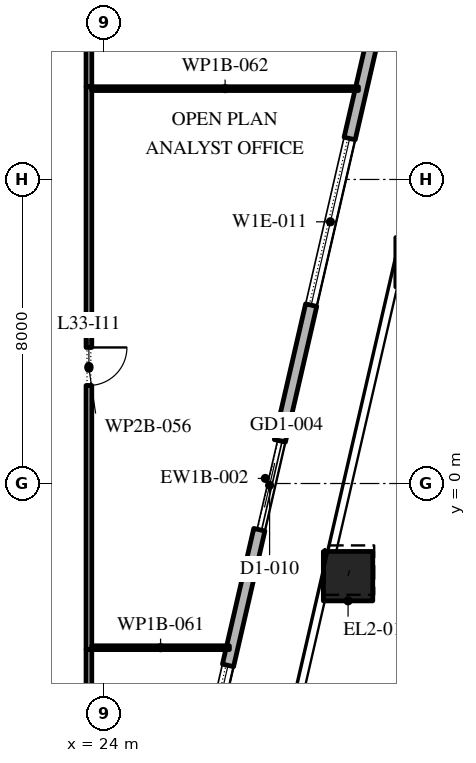
"""IFC4 building model, lengths in metres.
Left out: names, types, materials, properties, quantities, classifications, styles, units other than length and angle.
Written with IfcOpenShell. Run it as: python <this file> out.ifc"""

import sys

from ifc_helpers import new_model, si_unit, direction, frame, frame_2d, origin, origin_2d, place, context, subcontext, project, spatial, rectangle, extrude, element, fill, save


model = new_model("IFC4")
c1 = context("Model", 3, precision=1e-05, world=origin(), true_north=direction((0.0, 1.0)))
c2 = subcontext(c1, "Body", "Model", "MODEL_VIEW")
j1 = project(units=[si_unit("LENGTHUNIT", "METRE"), si_unit("PLANEANGLEUNIT", "RADIAN")], contexts=[c1])
p1 = place(None, origin())
s1 = spatial("IfcSite", under=j1, at=p1, CompositionType="ELEMENT")
p2 = place(p1, origin())
s2 = spatial("IfcBuilding", under=s1, at=p2, CompositionType="ELEMENT")
p3 = place(p2, frame((0.0, 0.0, 151.8)))
s3 = spatial("IfcBuildingStorey", under=s2, at=p3, CompositionType="ELEMENT", Elevation=151.8)
p4 = place(p3, frame((30.419, -2.438, 0.0), z_axis=(0.008770904004, 0.037871717951, 0.999244116431), x_axis=(-0.974214614928, 0.225623323396, 0.0)))
e1 = element("IfcColumn", 1, at=p4, inside=s3, PredefinedType="COLUMN", context=c2, shape_type="SweptSolid", body=[
    extrude(rectangle(XDim=1.3, YDim=1.3, at=origin_2d()), origin(), (0.0, 0.0, 1.0), 4.203),
])
p5 = place(p3, frame((32.326, 5.823, 0.0), z_axis=(0.011668267153, 0.050562490995, 0.998652735462), x_axis=(-0.974391195695, 0.224859506699, 0.0)))
e2 = element("IfcColumn", 2, at=p5, inside=s3, PredefinedType="COLUMN", context=c2, shape_type="SweptSolid", body=[
    extrude(rectangle(XDim=1.3, YDim=1.3, at=origin_2d()), origin(), (0.0, 0.0, 1.0), 4.206),
])
p6 = place(p3, frame((22.82, -24.016, 0.0), z_axis=(0.0, 0.0, 1.0), x_axis=(0.224953880882, 0.974369412223, 0.0)))
e3 = element("IfcWall", 3, at=p6, inside=s3, PredefinedType="STANDARD", context=c2, shape_type="SweptSolid", body=[
    extrude(rectangle(XDim=49.5, YDim=0.3, at=frame_2d((24.75, 0.0))), origin(), (0.0, 0.0, 1.0), 3.95),
])
p7 = place(p6, frame((1.157, 0.0, 0.45)))
e4 = element("IfcOpeningElement", 4, at=p7, cuts=e3, PredefinedType="OPENING", context=c2, shape_type="SweptSolid", body=[
    extrude(rectangle(XDim=4.5, YDim=3.05, at=frame_2d((2.25, 1.525))), frame((0.0, 0.16, 0.0), z_axis=(0.0, -1.0, 0.0), x_axis=(1.0, 0.0, 0.0)), (0.0, 0.0, 1.0), 0.32),
])
p8 = place(p6, frame((8.121, 0.0, 0.45)))
e5 = element("IfcOpeningElement", 5, at=p8, cuts=e3, PredefinedType="OPENING", context=c2, shape_type="SweptSolid", body=[
    extrude(rectangle(XDim=4.5, YDim=3.05, at=frame_2d((2.25, 1.525))), frame((0.0, 0.16, 0.0), z_axis=(0.0, -1.0, 0.0), x_axis=(1.0, 0.0, 0.0)), (0.0, 0.0, 1.0), 0.32),
])
p9 = place(p6, frame((15.236, 0.0, 0.45)))
e6 = element("IfcOpeningElement", 6, at=p9, cuts=e3, PredefinedType="OPENING", context=c2, shape_type="SweptSolid", body=[
    extrude(rectangle(XDim=4.5, YDim=3.05, at=frame_2d((2.25, 1.525))), frame((0.0, 0.16, 0.0), z_axis=(0.0, -1.0, 0.0), x_axis=(1.0, 0.0, 0.0)), (0.0, 0.0, 1.0), 0.32),
])
p10 = place(p6, frame((23.4, 0.0, 0.0)))
e7 = element("IfcOpeningElement", 7, at=p10, cuts=e3, PredefinedType="OPENING", context=c2, shape_type="SweptSolid", body=[
    extrude(rectangle(XDim=2.4, YDim=3.5, at=frame_2d((1.2, 1.75))), frame((0.0, 0.16, 0.0), z_axis=(0.0, -1.0, 0.0), x_axis=(1.0, 0.0, 0.0)), (0.0, 0.0, 1.0), 0.32),
])
p11 = place(p6, frame((29.464, 0.0, 0.45)))
e8 = element("IfcOpeningElement", 8, at=p11, cuts=e3, PredefinedType="OPENING", context=c2, shape_type="SweptSolid", body=[
    extrude(rectangle(XDim=4.5, YDim=2.825, at=frame_2d((2.25, 1.413))), frame((0.0, 0.16, 0.0), z_axis=(0.0, -1.0, 0.0), x_axis=(1.0, 0.0, 0.0)), (0.0, 0.0, 1.0), 0.32),
])
p12 = place(p6, frame((36.579, 0.0, 0.45)))
e9 = element("IfcOpeningElement", 9, at=p12, cuts=e3, PredefinedType="OPENING", context=c2, shape_type="SweptSolid", body=[
    extrude(rectangle(XDim=4.5, YDim=2.775, at=frame_2d((2.25, 1.387))), frame((0.0, 0.16, 0.0), z_axis=(0.0, -1.0, 0.0), x_axis=(1.0, 0.0, 0.0)), (0.0, 0.0, 1.0), 0.32),
])
p13 = place(p6, frame((43.693, 0.0, 0.45)))
e10 = element("IfcOpeningElement", 10, at=p13, cuts=e3, PredefinedType="OPENING", context=c2, shape_type="SweptSolid", body=[
    extrude(rectangle(XDim=4.5, YDim=2.7, at=frame_2d((2.25, 1.35))), frame((0.0, 0.16, 0.0), z_axis=(0.0, -1.0, 0.0), x_axis=(1.0, 0.0, 0.0)), (0.0, 0.0, 1.0), 0.32),
])
p14 = place(p3, frame((23.6, -4.37, 0.0), z_axis=(0.0, 0.0, 1.0), x_axis=(0.0, -1.0, 0.0)))
e11 = element("IfcWall", 11, at=p14, inside=s3, PredefinedType="PARTITIONING", context=c2, shape_type="SweptSolid", body=[
    extrude(rectangle(XDim=2.855, YDim=0.15, at=frame_2d((1.427, 0.0))), origin(), (0.0, 0.0, 1.0), 3.95),
])
p15 = place(p3, frame((23.6, 10.44, 0.0), z_axis=(0.0, 0.0, 1.0), x_axis=(0.0, -1.0, 0.0)))
e12 = element("IfcWall", 12, at=p15, inside=s3, PredefinedType="PARTITIONING", context=c2, shape_type="SweptSolid", body=[
    extrude(rectangle(XDim=14.81, YDim=0.15, at=frame_2d((7.405, 0.0))), origin(), (0.0, 0.0, 1.0), 3.95),
])
p16 = place(p15, frame((6.86, 0.0, 0.0)))
e13 = element("IfcOpeningElement", 13, at=p16, cuts=e12, PredefinedType="OPENING", context=c2, shape_type="SweptSolid", body=[
    extrude(rectangle(XDim=1.0, YDim=2.1, at=frame_2d((0.5, 1.05))), frame((0.0, 0.085, 0.0), z_axis=(0.0, -1.0, 0.0), x_axis=(1.0, 0.0, 0.0)), (0.0, 0.0, 1.0), 0.17),
])
p17 = place(p3, frame((23.6, 23.46, 0.0), z_axis=(0.0, 0.0, 1.0), x_axis=(0.0, -1.0, 0.0)))
e14 = element("IfcWall", 14, at=p17, inside=s3, PredefinedType="PARTITIONING", context=c2, shape_type="SweptSolid", body=[
    extrude(rectangle(XDim=13.02, YDim=0.15, at=frame_2d((6.51, 0.0))), origin(), (0.0, 0.0, 1.0), 3.95),
])
p18 = place(p17, frame((6.17, 0.0, 0.0)))
e15 = element("IfcOpeningElement", 15, at=p18, cuts=e14, PredefinedType="OPENING", context=c2, shape_type="SweptSolid", body=[
    extrude(rectangle(XDim=1.0, YDim=2.1, at=frame_2d((0.5, 1.05))), frame((0.0, 0.085, 0.0), z_axis=(0.0, -1.0, 0.0), x_axis=(1.0, 0.0, 0.0)), (0.0, 0.0, 1.0), 0.17),
])
p19 = place(p3, frame((27.296, -4.32, 0.0), z_axis=(0.0, 0.0, 1.0), x_axis=(-1.0, 0.0, 0.0)))
e16 = element("IfcWall", 16, at=p19, inside=s3, PredefinedType="PARTITIONING", context=c2, shape_type="SweptSolid", body=[
    extrude(rectangle(XDim=3.621, YDim=0.1, at=frame_2d((1.811, 0.0))), origin(), (0.0, 0.0, 1.0), 3.95),
])
p20 = place(p3, frame((30.692, 10.39, 0.0), z_axis=(0.0, 0.0, 1.0), x_axis=(-1.0, 0.0, 0.0)))
e17 = element("IfcWall", 17, at=p20, inside=s3, PredefinedType="PARTITIONING", context=c2, shape_type="SweptSolid", body=[
    extrude(rectangle(XDim=7.017, YDim=0.1, at=frame_2d((3.508, 0.0))), origin(), (0.0, 0.0, 1.0), 3.95),
])
p21 = place(p9, origin())
e18 = element("IfcWindow", 18, at=p21, inside=s3, PartitioningType="DOUBLE_PANEL_VERTICAL", PredefinedType="WINDOW", context=c2, shape_type="SweptSolid", body=[
    extrude(rectangle(XDim=4.5, YDim=3.05, at=frame_2d((2.25, 1.525))), frame((0.0, 0.03, 0.0), z_axis=(0.0, -1.0, 0.0), x_axis=(1.0, 0.0, 0.0)), (0.0, 0.0, 1.0), 0.06),
])
fill(e6, e18)
p22 = place(p10, origin())
e19 = element("IfcDoor", 19, at=p22, inside=s3, OperationType="DOUBLE_DOOR_SLIDING", PredefinedType="DOOR", context=c2, shape_type="SweptSolid", body=[
    extrude(rectangle(XDim=2.4, YDim=3.5, at=frame_2d((1.2, 1.75))), frame((0.0, 0.025, 0.0), z_axis=(0.0, -1.0, 0.0), x_axis=(1.0, 0.0, 0.0)), (0.0, 0.0, 1.0), 0.05),
])
fill(e7, e19)
p23 = place(p11, origin())
e20 = element("IfcWindow", 20, at=p23, inside=s3, PartitioningType="DOUBLE_PANEL_VERTICAL", PredefinedType="WINDOW", context=c2, shape_type="SweptSolid", body=[
    extrude(rectangle(XDim=4.5, YDim=2.825, at=frame_2d((2.25, 1.413))), frame((0.0, 0.03, 0.0), z_axis=(0.0, -1.0, 0.0), x_axis=(1.0, 0.0, 0.0)), (0.0, 0.0, 1.0), 0.06),
])
fill(e8, e20)
p24 = place(p16, origin())
e21 = element("IfcDoor", 21, at=p24, inside=s3, OperationType="SINGLE_SWING_RIGHT", PredefinedType="DOOR", context=c2, shape_type="SweptSolid", body=[
    extrude(rectangle(XDim=1.0, YDim=2.1, at=frame_2d((0.5, 1.05))), frame((0.0, 0.025, 0.0), z_axis=(0.0, -1.0, 0.0), x_axis=(1.0, 0.0, 0.0)), (0.0, 0.0, 1.0), 0.05),
])
fill(e13, e21)
save(model, sys.argv[1])
